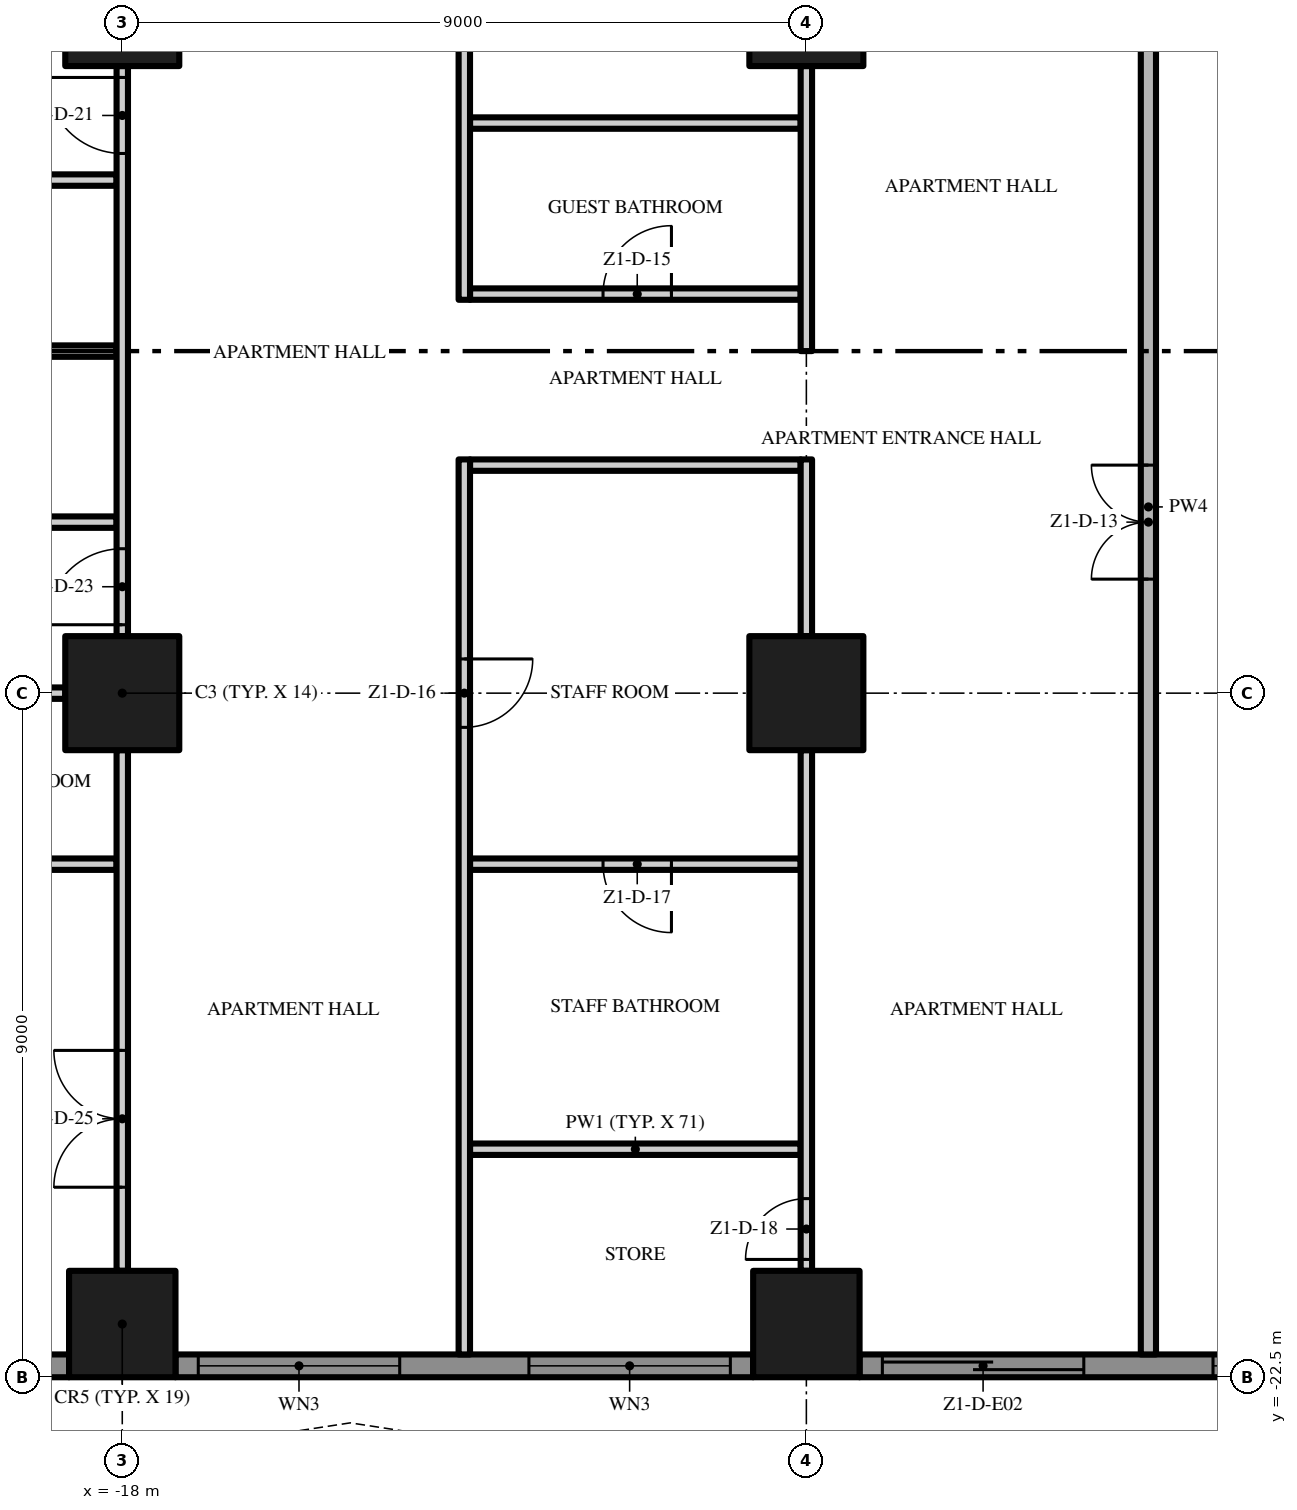
"""IFC4 building model, lengths in metres.
Left out: names, types, materials, properties, quantities, classifications, styles, units other than length and angle.
Written with IfcOpenShell. Run it as: python <this file> out.ifc"""

import sys

from ifc_helpers import new_model, si_unit, direction, frame, frame_2d, origin, origin_2d, place, context, subcontext, project, spatial, polyline, rectangle, outline, extrude, element, fill, save


model = new_model("IFC4")
c1 = context("Model", 3, precision=1e-05, world=origin(), true_north=direction((0.0, 1.0)))
c2 = subcontext(c1, "Body", "Model", "MODEL_VIEW")
j1 = project(units=[si_unit("LENGTHUNIT", "METRE"), si_unit("PLANEANGLEUNIT", "RADIAN")], contexts=[c1])
p1 = place(None, origin())
s1 = spatial("IfcSite", under=j1, at=p1, CompositionType="ELEMENT")
p2 = place(p1, origin())
s2 = spatial("IfcBuilding", under=s1, at=p2, CompositionType="ELEMENT")
p3 = place(p2, frame((0.0, 0.0, 53.0)))
s3 = spatial("IfcBuildingStorey", under=s2, at=p3, CompositionType="ELEMENT", Elevation=53.0)
p4 = place(p3, frame((-18.0, -13.5, 0.0), z_axis=(0.0, 0.0, 1.0), x_axis=(1.0, 0.0, 0.0)))
e1 = element("IfcColumn", 1, at=p4, inside=s3, PredefinedType="COLUMN", context=c2, shape_type="SweptSolid", body=[
    extrude(rectangle(XDim=1.5, YDim=1.5, at=origin_2d()), origin(), (0.0, 0.0, 1.0), 3.5),
])
p5 = place(p3, frame((-18.0, -21.8, 0.0), z_axis=(0.0, 0.0, 1.0), x_axis=(1.0, 0.0, 0.0)))
e2 = element("IfcColumn", 2, at=p5, inside=s3, PredefinedType="COLUMN", context=c2, shape_type="SweptSolid", body=[
    extrude(rectangle(XDim=1.4, YDim=1.4, at=origin_2d()), origin(), (0.0, 0.0, 1.0), 3.5),
])
for number, where, z_axis, x_axis in (
    (3, (-18.0, -4.5, 0.0), (0.0, 0.0, 1.0), (1.0, 0.0, 0.0)),
    (4, (-9.0, -13.5, 0.0), (0.0, 0.0, 1.0), (1.0, 0.0, 0.0)),
):
    element("IfcColumn", number, at=place(p3, frame(where, z_axis=z_axis, x_axis=x_axis)), inside=s3, PredefinedType="COLUMN", context=c2, shape_type="SweptSolid", body=[
        extrude(rectangle(XDim=1.5, YDim=1.5, at=origin_2d()), origin(), (0.0, 0.0, 1.0), 3.5),
    ])
p6 = place(p3, frame((-9.0, -21.8, 0.0), z_axis=(0.0, 0.0, 1.0), x_axis=(1.0, 0.0, 0.0)))
e5 = element("IfcColumn", 5, at=p6, inside=s3, PredefinedType="COLUMN", context=c2, shape_type="SweptSolid", body=[
    extrude(rectangle(XDim=1.4, YDim=1.4, at=origin_2d()), origin(), (0.0, 0.0, 1.0), 3.5),
])
p7 = place(p3, frame((-9.0, -4.5, 0.0), z_axis=(0.0, 0.0, 1.0), x_axis=(1.0, 0.0, 0.0)))
e6 = element("IfcColumn", 6, at=p7, inside=s3, PredefinedType="COLUMN", context=c2, shape_type="SweptSolid", body=[
    extrude(rectangle(XDim=1.5, YDim=1.5, at=origin_2d()), origin(), (0.0, 0.0, 1.0), 3.5),
])
p8 = place(p3, frame((-18.7, -22.35, 0.0), z_axis=(0.0, 0.0, 1.0), x_axis=(-1.0, 0.0, 0.0)))
e7 = element("IfcWall", 7, at=p8, inside=s3, PredefinedType="SOLIDWALL", context=c2, shape_type="SweptSolid", body=[
    extrude(rectangle(XDim=3.5, YDim=0.3, at=frame_2d((1.75, 0.0))), origin(), (0.0, 0.0, 1.0), 3.5),
])
p9 = place(p8, frame((0.3, 0.0, 0.0)))
e8 = element("IfcOpeningElement", 8, at=p9, cuts=e7, PredefinedType="OPENING", context=c2, shape_type="SweptSolid", body=[
    extrude(rectangle(XDim=2.65, YDim=2.4, at=frame_2d((1.325, 1.2))), frame((0.0, 0.16, 0.0), z_axis=(0.0, -1.0, 0.0), x_axis=(1.0, 0.0, 0.0)), (0.0, 0.0, 1.0), 0.32),
])
p10 = place(p3, frame((-9.7, -22.35, 0.0), z_axis=(0.0, 0.0, 1.0), x_axis=(-1.0, 0.0, 0.0)))
e9 = element("IfcWall", 9, at=p10, inside=s3, PredefinedType="SOLIDWALL", context=c2, shape_type="SweptSolid", body=[
    extrude(rectangle(XDim=7.6, YDim=0.3, at=frame_2d((3.8, 0.0))), origin(), (0.0, 0.0, 1.0), 3.5),
])
p11 = place(p10, frame((4.65, 0.0, 0.45)))
e10 = element("IfcOpeningElement", 10, at=p11, cuts=e9, PredefinedType="OPENING", context=c2, shape_type="SweptSolid", body=[
    extrude(rectangle(XDim=2.65, YDim=2.65, at=frame_2d((1.325, 1.325))), frame((0.0, 0.16, 0.0), z_axis=(0.0, -1.0, 0.0), x_axis=(1.0, 0.0, 0.0)), (0.0, 0.0, 1.0), 0.32),
])
p12 = place(p10, frame((0.3, 0.0, 0.45)))
e11 = element("IfcOpeningElement", 11, at=p12, cuts=e9, PredefinedType="OPENING", context=c2, shape_type="SweptSolid", body=[
    extrude(rectangle(XDim=2.65, YDim=2.65, at=frame_2d((1.325, 1.325))), frame((0.0, 0.16, 0.0), z_axis=(0.0, -1.0, 0.0), x_axis=(1.0, 0.0, 0.0)), (0.0, 0.0, 1.0), 0.32),
])
p13 = place(p3, frame((-0.7, -22.35, 0.0), z_axis=(0.0, 0.0, 1.0), x_axis=(-1.0, 0.0, 0.0)))
e12 = element("IfcWall", 12, at=p13, inside=s3, PredefinedType="SOLIDWALL", context=c2, shape_type="SweptSolid", body=[
    extrude(rectangle(XDim=7.6, YDim=0.3, at=frame_2d((3.8, 0.0))), origin(), (0.0, 0.0, 1.0), 3.5),
])
p14 = place(p13, frame((4.65, 0.0, 0.0)))
e13 = element("IfcOpeningElement", 13, at=p14, cuts=e12, PredefinedType="OPENING", context=c2, shape_type="SweptSolid", body=[
    extrude(rectangle(XDim=2.65, YDim=2.4, at=frame_2d((1.325, 1.2))), frame((0.0, 0.16, 0.0), z_axis=(0.0, -1.0, 0.0), x_axis=(1.0, 0.0, 0.0)), (0.0, 0.0, 1.0), 0.32),
])
p15 = place(p13, frame((0.3, 0.0, 0.45)))
e14 = element("IfcOpeningElement", 14, at=p15, cuts=e12, PredefinedType="OPENING", context=c2, shape_type="SweptSolid", body=[
    extrude(rectangle(XDim=2.65, YDim=2.65, at=frame_2d((1.325, 1.325))), frame((0.0, 0.16, 0.0), z_axis=(0.0, -1.0, 0.0), x_axis=(1.0, 0.0, 0.0)), (0.0, 0.0, 1.0), 0.32),
])
p16 = place(p3, origin())
e15 = element("IfcWall", 15, at=p16, inside=s3, PredefinedType="USERDEFINED", context=c2, shape_type="SweptSolid", body=[
    extrude(outline(polyline([(-22.5, -25.5), (-21.0, -25.271), (-19.5, -24.671), (-18.0, -23.929), (-16.5, -23.329), (-15.0, -23.1), (-13.5, -23.329), (-12.0, -23.929), (-10.5, -24.671), (-9.0, -25.271), (-7.5, -25.5), (-6.0, -25.271), (-4.5, -24.671), (-3.0, -23.929), (-1.5, -23.329), (0.0, -23.1), (1.5, -23.329), (3.0, -23.929), (4.5, -24.671), (6.0, -25.271), (7.5, -25.5), (9.0, -25.271), (10.5, -24.671), (12.0, -23.929), (13.5, -23.329), (15.0, -23.1), (16.5, -23.329), (18.0, -23.929), (19.5, -24.671), (21.0, -25.271), (22.5, -25.5), (22.538, -25.253), (21.066, -25.028), (19.602, -24.442), (18.102, -23.701), (16.566, -23.086), (15.0, -22.847), (13.434, -23.086), (11.898, -23.701), (10.398, -24.442), (8.934, -25.028), (7.5, -25.247), (6.066, -25.028), (4.602, -24.442), (3.102, -23.701), (1.566, -23.086), (0.0, -22.847), (-1.566, -23.086), (-3.102, -23.701), (-4.602, -24.442), (-6.066, -25.028), (-7.5, -25.247), (-8.934, -25.028), (-10.398, -24.442), (-11.898, -23.701), (-13.434, -23.086), (-15.0, -22.847), (-16.566, -23.086), (-18.102, -23.701), (-19.602, -24.442), (-21.066, -25.028), (-22.538, -25.253), (-22.5, -25.5)])), origin(), (0.0, 0.0, 1.0), 0.9),
])
p17 = place(p3, frame((-13.425, -19.5, 0.0), z_axis=(0.0, 0.0, 1.0), x_axis=(1.0, 0.0, 0.0)))
e16 = element("IfcWall", 16, at=p17, inside=s3, PredefinedType="PARTITIONING", context=c2, shape_type="SweptSolid", body=[
    extrude(rectangle(XDim=4.35, YDim=0.15, at=frame_2d((2.175, 0.0))), origin(), (0.0, 0.0, 1.0), 3.5),
])
p18 = place(p3, frame((-20.925, -15.75, 0.0), z_axis=(0.0, 0.0, 1.0), x_axis=(1.0, 0.0, 0.0)))
e17 = element("IfcWall", 17, at=p18, inside=s3, PredefinedType="PARTITIONING", context=c2, shape_type="SweptSolid", body=[
    extrude(rectangle(XDim=2.85, YDim=0.15, at=frame_2d((1.425, 0.0))), origin(), (0.0, 0.0, 1.0), 3.5),
])
p19 = place(p3, frame((-9.075, -15.75, 0.0), z_axis=(0.0, 0.0, 1.0), x_axis=(-1.0, 0.0, 0.0)))
e18 = element("IfcWall", 18, at=p19, inside=s3, PredefinedType="PARTITIONING", context=c2, shape_type="SweptSolid", body=[
    extrude(rectangle(XDim=4.35, YDim=0.15, at=frame_2d((2.175, 0.0))), origin(), (0.0, 0.0, 1.0), 3.5),
])
p20 = place(p19, frame((1.7, 0.0, 0.0)))
e19 = element("IfcOpeningElement", 19, at=p20, cuts=e18, PredefinedType="OPENING", context=c2, shape_type="SweptSolid", body=[
    extrude(rectangle(XDim=0.9, YDim=2.1, at=frame_2d((0.45, 1.05))), frame((0.0, 0.085, 0.0), z_axis=(0.0, -1.0, 0.0), x_axis=(1.0, 0.0, 0.0)), (0.0, 0.0, 1.0), 0.17),
])
p21 = place(p3, frame((-25.6, -13.5, 0.0), z_axis=(0.0, 0.0, 1.0), x_axis=(1.0, 0.0, 0.0)))
e20 = element("IfcWall", 20, at=p21, inside=s3, PredefinedType="PARTITIONING", context=c2, shape_type="SweptSolid", body=[
    extrude(rectangle(XDim=6.85, YDim=0.15, at=frame_2d((3.425, 0.0))), origin(), (0.0, 0.0, 1.0), 3.5),
])
p22 = place(p3, frame((-20.925, -11.25, 0.0), z_axis=(0.0, 0.0, 1.0), x_axis=(1.0, 0.0, 0.0)))
e21 = element("IfcWall", 21, at=p22, inside=s3, PredefinedType="PARTITIONING", context=c2, shape_type="SweptSolid", body=[
    extrude(rectangle(XDim=2.85, YDim=0.15, at=frame_2d((1.425, 0.0))), origin(), (0.0, 0.0, 1.0), 3.5),
])
p23 = place(p3, frame((-13.425, -10.5, 0.0), z_axis=(0.0, 0.0, 1.0), x_axis=(1.0, 0.0, 0.0)))
e22 = element("IfcWall", 22, at=p23, inside=s3, PredefinedType="PARTITIONING", context=c2, shape_type="SweptSolid", body=[
    extrude(rectangle(XDim=4.35, YDim=0.15, at=frame_2d((2.175, 0.0))), origin(), (0.0, 0.0, 1.0), 3.5),
])
p24 = place(p3, frame((-20.925, -9.0, 0.0), z_axis=(0.0, 0.0, 1.0), x_axis=(1.0, 0.0, 0.0)))
e23 = element("IfcWall", 23, at=p24, inside=s3, PredefinedType="PARTITIONING", context=c2, shape_type="SweptSolid", body=[
    extrude(rectangle(XDim=2.85, YDim=0.15, at=frame_2d((1.425, 0.0))), origin(), (0.0, 0.0, 1.0), 3.5),
])
p25 = place(p3, frame((-13.425, -8.25, 0.0), z_axis=(0.0, 0.0, 1.0), x_axis=(1.0, 0.0, 0.0)))
e24 = element("IfcWall", 24, at=p25, inside=s3, PredefinedType="PARTITIONING", context=c2, shape_type="SweptSolid", body=[
    extrude(rectangle(XDim=4.35, YDim=0.15, at=frame_2d((2.175, 0.0))), origin(), (0.0, 0.0, 1.0), 3.5),
])
p26 = place(p25, frame((1.75, 0.0, 0.0)))
e25 = element("IfcOpeningElement", 25, at=p26, cuts=e24, PredefinedType="OPENING", context=c2, shape_type="SweptSolid", body=[
    extrude(rectangle(XDim=0.9, YDim=2.1, at=frame_2d((0.45, 1.05))), frame((0.0, 0.085, 0.0), z_axis=(0.0, -1.0, 0.0), x_axis=(1.0, 0.0, 0.0)), (0.0, 0.0, 1.0), 0.17),
])
p27 = place(p3, frame((-20.925, -6.75, 0.0), z_axis=(0.0, 0.0, 1.0), x_axis=(1.0, 0.0, 0.0)))
e26 = element("IfcWall", 26, at=p27, inside=s3, PredefinedType="PARTITIONING", context=c2, shape_type="SweptSolid", body=[
    extrude(rectangle(XDim=2.85, YDim=0.15, at=frame_2d((1.425, 0.0))), origin(), (0.0, 0.0, 1.0), 3.5),
])
p28 = place(p3, frame((-13.425, -6.0, 0.0), z_axis=(0.0, 0.0, 1.0), x_axis=(1.0, 0.0, 0.0)))
e27 = element("IfcWall", 27, at=p28, inside=s3, PredefinedType="PARTITIONING", context=c2, shape_type="SweptSolid", body=[
    extrude(rectangle(XDim=4.35, YDim=0.15, at=frame_2d((2.175, 0.0))), origin(), (0.0, 0.0, 1.0), 3.5),
])
p29 = place(p3, frame((-18.0, -21.1, 0.0), z_axis=(0.0, 0.0, 1.0), x_axis=(0.0, 1.0, 0.0)))
e28 = element("IfcWall", 28, at=p29, inside=s3, PredefinedType="PARTITIONING", context=c2, shape_type="SweptSolid", body=[
    extrude(rectangle(XDim=6.85, YDim=0.15, at=frame_2d((3.425, 0.0))), origin(), (0.0, 0.0, 1.0), 3.5),
])
p30 = place(p29, frame((1.1, 0.0, 0.0)))
e29 = element("IfcOpeningElement", 29, at=p30, cuts=e28, PredefinedType="OPENING", context=c2, shape_type="SweptSolid", body=[
    extrude(rectangle(XDim=1.8, YDim=2.4, at=frame_2d((0.9, 1.2))), frame((0.0, 0.085, 0.0), z_axis=(0.0, -1.0, 0.0), x_axis=(1.0, 0.0, 0.0)), (0.0, 0.0, 1.0), 0.17),
])
p31 = place(p3, frame((-18.0, -12.75, 0.0), z_axis=(0.0, 0.0, 1.0), x_axis=(0.0, 1.0, 0.0)))
e30 = element("IfcWall", 30, at=p31, inside=s3, PredefinedType="PARTITIONING", context=c2, shape_type="SweptSolid", body=[
    extrude(rectangle(XDim=7.5, YDim=0.15, at=frame_2d((3.75, 0.0))), origin(), (0.0, 0.0, 1.0), 3.5),
])
p32 = place(p31, frame((6.35, 0.0, 0.0)))
e31 = element("IfcOpeningElement", 31, at=p32, cuts=e30, PredefinedType="OPENING", context=c2, shape_type="SweptSolid", body=[
    extrude(rectangle(XDim=1.0, YDim=2.4, at=frame_2d((0.5, 1.2))), frame((0.0, 0.085, 0.0), z_axis=(0.0, -1.0, 0.0), x_axis=(1.0, 0.0, 0.0)), (0.0, 0.0, 1.0), 0.17),
])
p33 = place(p31, frame((0.15, 0.0, 0.0)))
e32 = element("IfcOpeningElement", 32, at=p33, cuts=e30, PredefinedType="OPENING", context=c2, shape_type="SweptSolid", body=[
    extrude(rectangle(XDim=1.0, YDim=2.4, at=frame_2d((0.5, 1.2))), frame((0.0, 0.085, 0.0), z_axis=(0.0, -1.0, 0.0), x_axis=(1.0, 0.0, 0.0)), (0.0, 0.0, 1.0), 0.17),
])
p34 = place(p3, frame((-13.5, -10.425, 0.0), z_axis=(0.0, 0.0, 1.0), x_axis=(0.0, -1.0, 0.0)))
e33 = element("IfcWall", 33, at=p34, inside=s3, PredefinedType="PARTITIONING", context=c2, shape_type="SweptSolid", body=[
    extrude(rectangle(XDim=11.775, YDim=0.15, at=frame_2d((5.888, 0.0))), origin(), (0.0, 0.0, 1.0), 3.5),
])
p35 = place(p34, frame((2.625, 0.0, 0.0)))
e34 = element("IfcOpeningElement", 34, at=p35, cuts=e33, PredefinedType="OPENING", context=c2, shape_type="SweptSolid", body=[
    extrude(rectangle(XDim=0.9, YDim=2.1, at=frame_2d((0.45, 1.05))), frame((0.0, 0.085, 0.0), z_axis=(0.0, -1.0, 0.0), x_axis=(1.0, 0.0, 0.0)), (0.0, 0.0, 1.0), 0.17),
])
p36 = place(p3, frame((-13.5, -8.325, 0.0), z_axis=(0.0, 0.0, 1.0), x_axis=(0.0, 1.0, 0.0)))
e35 = element("IfcWall", 35, at=p36, inside=s3, PredefinedType="PARTITIONING", context=c2, shape_type="SweptSolid", body=[
    extrude(rectangle(XDim=8.225, YDim=0.15, at=frame_2d((4.112, 0.0))), origin(), (0.0, 0.0, 1.0), 3.5),
])
p37 = place(p3, frame((-9.0, -21.1, 0.0), z_axis=(0.0, 0.0, 1.0), x_axis=(0.0, 1.0, 0.0)))
e36 = element("IfcWall", 36, at=p37, inside=s3, PredefinedType="PARTITIONING", context=c2, shape_type="SweptSolid", body=[
    extrude(rectangle(XDim=6.85, YDim=0.15, at=frame_2d((3.425, 0.0))), origin(), (0.0, 0.0, 1.0), 3.5),
])
p38 = place(p37, frame((0.15, 0.0, 0.0)))
e37 = element("IfcOpeningElement", 37, at=p38, cuts=e36, PredefinedType="OPENING", context=c2, shape_type="SweptSolid", body=[
    extrude(rectangle(XDim=0.8, YDim=2.0, at=frame_2d((0.4, 1.0))), frame((0.0, 0.085, 0.0), z_axis=(0.0, -1.0, 0.0), x_axis=(1.0, 0.0, 0.0)), (0.0, 0.0, 1.0), 0.17),
])
p39 = place(p3, frame((-9.0, -12.75, 0.0), z_axis=(0.0, 0.0, 1.0), x_axis=(0.0, 1.0, 0.0)))
e38 = element("IfcWall", 38, at=p39, inside=s3, PredefinedType="PARTITIONING", context=c2, shape_type="SweptSolid", body=[
    extrude(rectangle(XDim=2.325, YDim=0.15, at=frame_2d((1.163, 0.0))), origin(), (0.0, 0.0, 1.0), 3.5),
])
p40 = place(p3, frame((-9.0, -9.0, 0.0), z_axis=(0.0, 0.0, 1.0), x_axis=(0.0, 1.0, 0.0)))
e39 = element("IfcWall", 39, at=p40, inside=s3, PredefinedType="PARTITIONING", context=c2, shape_type="SweptSolid", body=[
    extrude(rectangle(XDim=3.75, YDim=0.15, at=frame_2d((1.875, 0.0))), origin(), (0.0, 0.0, 1.0), 3.5),
])
p41 = place(p3, frame((-4.5, -22.2, 0.0), z_axis=(0.0, 0.0, 1.0), x_axis=(0.0, 1.0, 0.0)))
e40 = element("IfcWall", 40, at=p41, inside=s3, PredefinedType="PARTITIONING", context=c2, shape_type="SweptSolid", body=[
    extrude(rectangle(XDim=22.3, YDim=0.2, at=frame_2d((11.15, 0.0))), origin(), (0.0, 0.0, 1.0), 3.5),
])
p42 = place(p41, frame((10.2, 0.0, 0.0)))
e41 = element("IfcOpeningElement", 41, at=p42, cuts=e40, PredefinedType="OPENING", context=c2, shape_type="SweptSolid", body=[
    extrude(rectangle(XDim=1.5, YDim=2.4, at=frame_2d((0.75, 1.2))), frame((0.0, 0.11, 0.0), z_axis=(0.0, -1.0, 0.0), x_axis=(1.0, 0.0, 0.0)), (0.0, 0.0, 1.0), 0.22),
])
p43 = place(p11, origin())
e42 = element("IfcWindow", 42, at=p43, inside=s3, PartitioningType="SINGLE_PANEL", PredefinedType="WINDOW", context=c2, shape_type="SweptSolid", body=[
    extrude(rectangle(XDim=2.65, YDim=2.65, at=frame_2d((1.325, 1.325))), frame((0.0, 0.03, 0.0), z_axis=(0.0, -1.0, 0.0), x_axis=(1.0, 0.0, 0.0)), (0.0, 0.0, 1.0), 0.06),
])
fill(e10, e42)
p44 = place(p12, origin())
e43 = element("IfcWindow", 43, at=p44, inside=s3, PartitioningType="SINGLE_PANEL", PredefinedType="WINDOW", context=c2, shape_type="SweptSolid", body=[
    extrude(rectangle(XDim=2.65, YDim=2.65, at=frame_2d((1.325, 1.325))), frame((0.0, 0.03, 0.0), z_axis=(0.0, -1.0, 0.0), x_axis=(1.0, 0.0, 0.0)), (0.0, 0.0, 1.0), 0.06),
])
fill(e11, e43)
p45 = place(p14, origin())
e44 = element("IfcDoor", 44, at=p45, inside=s3, OperationType="SINGLE_SWING_LEFT", PredefinedType="DOOR", context=c2, shape_type="SweptSolid", body=[
    extrude(rectangle(XDim=2.65, YDim=2.4, at=frame_2d((1.325, 1.2))), frame((0.0, 0.025, 0.0), z_axis=(0.0, -1.0, 0.0), x_axis=(1.0, 0.0, 0.0)), (0.0, 0.0, 1.0), 0.05),
])
fill(e13, e44)
p46 = place(p15, origin())
e45 = element("IfcWindow", 45, at=p46, inside=s3, PartitioningType="SINGLE_PANEL", PredefinedType="WINDOW", context=c2, shape_type="SweptSolid", body=[
    extrude(rectangle(XDim=2.65, YDim=2.65, at=frame_2d((1.325, 1.325))), frame((0.0, 0.03, 0.0), z_axis=(0.0, -1.0, 0.0), x_axis=(1.0, 0.0, 0.0)), (0.0, 0.0, 1.0), 0.06),
])
fill(e14, e45)
p47 = place(p42, origin())
e46 = element("IfcDoor", 46, at=p47, inside=s3, OperationType="DOUBLE_DOOR_SINGLE_SWING", PredefinedType="DOOR", context=c2, shape_type="SweptSolid", body=[
    extrude(rectangle(XDim=1.5, YDim=2.4, at=frame_2d((0.75, 1.2))), frame((0.0, 0.025, 0.0), z_axis=(0.0, -1.0, 0.0), x_axis=(1.0, 0.0, 0.0)), (0.0, 0.0, 1.0), 0.05),
])
fill(e41, e46)
p48 = place(p26, origin())
e47 = element("IfcDoor", 47, at=p48, inside=s3, OperationType="SINGLE_SWING_RIGHT", PredefinedType="DOOR", context=c2, shape_type="SweptSolid", body=[
    extrude(rectangle(XDim=0.9, YDim=2.1, at=frame_2d((0.45, 1.05))), frame((0.0, 0.025, 0.0), z_axis=(0.0, -1.0, 0.0), x_axis=(1.0, 0.0, 0.0)), (0.0, 0.0, 1.0), 0.05),
])
fill(e25, e47)
p49 = place(p35, origin())
e48 = element("IfcDoor", 48, at=p49, inside=s3, OperationType="SINGLE_SWING_LEFT", PredefinedType="DOOR", context=c2, shape_type="SweptSolid", body=[
    extrude(rectangle(XDim=0.9, YDim=2.1, at=frame_2d((0.45, 1.05))), frame((0.0, 0.025, 0.0), z_axis=(0.0, -1.0, 0.0), x_axis=(1.0, 0.0, 0.0)), (0.0, 0.0, 1.0), 0.05),
])
fill(e34, e48)
p50 = place(p20, origin())
e49 = element("IfcDoor", 49, at=p50, inside=s3, OperationType="SINGLE_SWING_LEFT", PredefinedType="DOOR", context=c2, shape_type="SweptSolid", body=[
    extrude(rectangle(XDim=0.9, YDim=2.1, at=frame_2d((0.45, 1.05))), frame((0.0, 0.025, 0.0), z_axis=(0.0, -1.0, 0.0), x_axis=(1.0, 0.0, 0.0)), (0.0, 0.0, 1.0), 0.05),
])
fill(e19, e49)
p51 = place(p38, origin())
e50 = element("IfcDoor", 50, at=p51, inside=s3, OperationType="SINGLE_SWING_LEFT", PredefinedType="DOOR", context=c2, shape_type="SweptSolid", body=[
    extrude(rectangle(XDim=0.8, YDim=2.0, at=frame_2d((0.4, 1.0))), frame((0.0, 0.025, 0.0), z_axis=(0.0, -1.0, 0.0), x_axis=(1.0, 0.0, 0.0)), (0.0, 0.0, 1.0), 0.05),
])
fill(e37, e50)
p52 = place(p32, origin())
e51 = element("IfcDoor", 51, at=p52, inside=s3, OperationType="SINGLE_SWING_RIGHT", PredefinedType="DOOR", context=c2, shape_type="SweptSolid", body=[
    extrude(rectangle(XDim=1.0, YDim=2.4, at=frame_2d((0.5, 1.2))), frame((0.0, 0.025, 0.0), z_axis=(0.0, -1.0, 0.0), x_axis=(1.0, 0.0, 0.0)), (0.0, 0.0, 1.0), 0.05),
])
fill(e31, e51)
p53 = place(p33, origin())
e52 = element("IfcDoor", 52, at=p53, inside=s3, OperationType="SINGLE_SWING_LEFT", PredefinedType="DOOR", context=c2, shape_type="SweptSolid", body=[
    extrude(rectangle(XDim=1.0, YDim=2.4, at=frame_2d((0.5, 1.2))), frame((0.0, 0.025, 0.0), z_axis=(0.0, -1.0, 0.0), x_axis=(1.0, 0.0, 0.0)), (0.0, 0.0, 1.0), 0.05),
])
fill(e32, e52)
p54 = place(p30, origin())
e53 = element("IfcDoor", 53, at=p54, inside=s3, OperationType="DOUBLE_DOOR_SINGLE_SWING", PredefinedType="DOOR", context=c2, shape_type="SweptSolid", body=[
    extrude(rectangle(XDim=1.8, YDim=2.4, at=frame_2d((0.9, 1.2))), frame((0.0, 0.025, 0.0), z_axis=(0.0, -1.0, 0.0), x_axis=(1.0, 0.0, 0.0)), (0.0, 0.0, 1.0), 0.05),
])
fill(e29, e53)
save(model, sys.argv[1])
